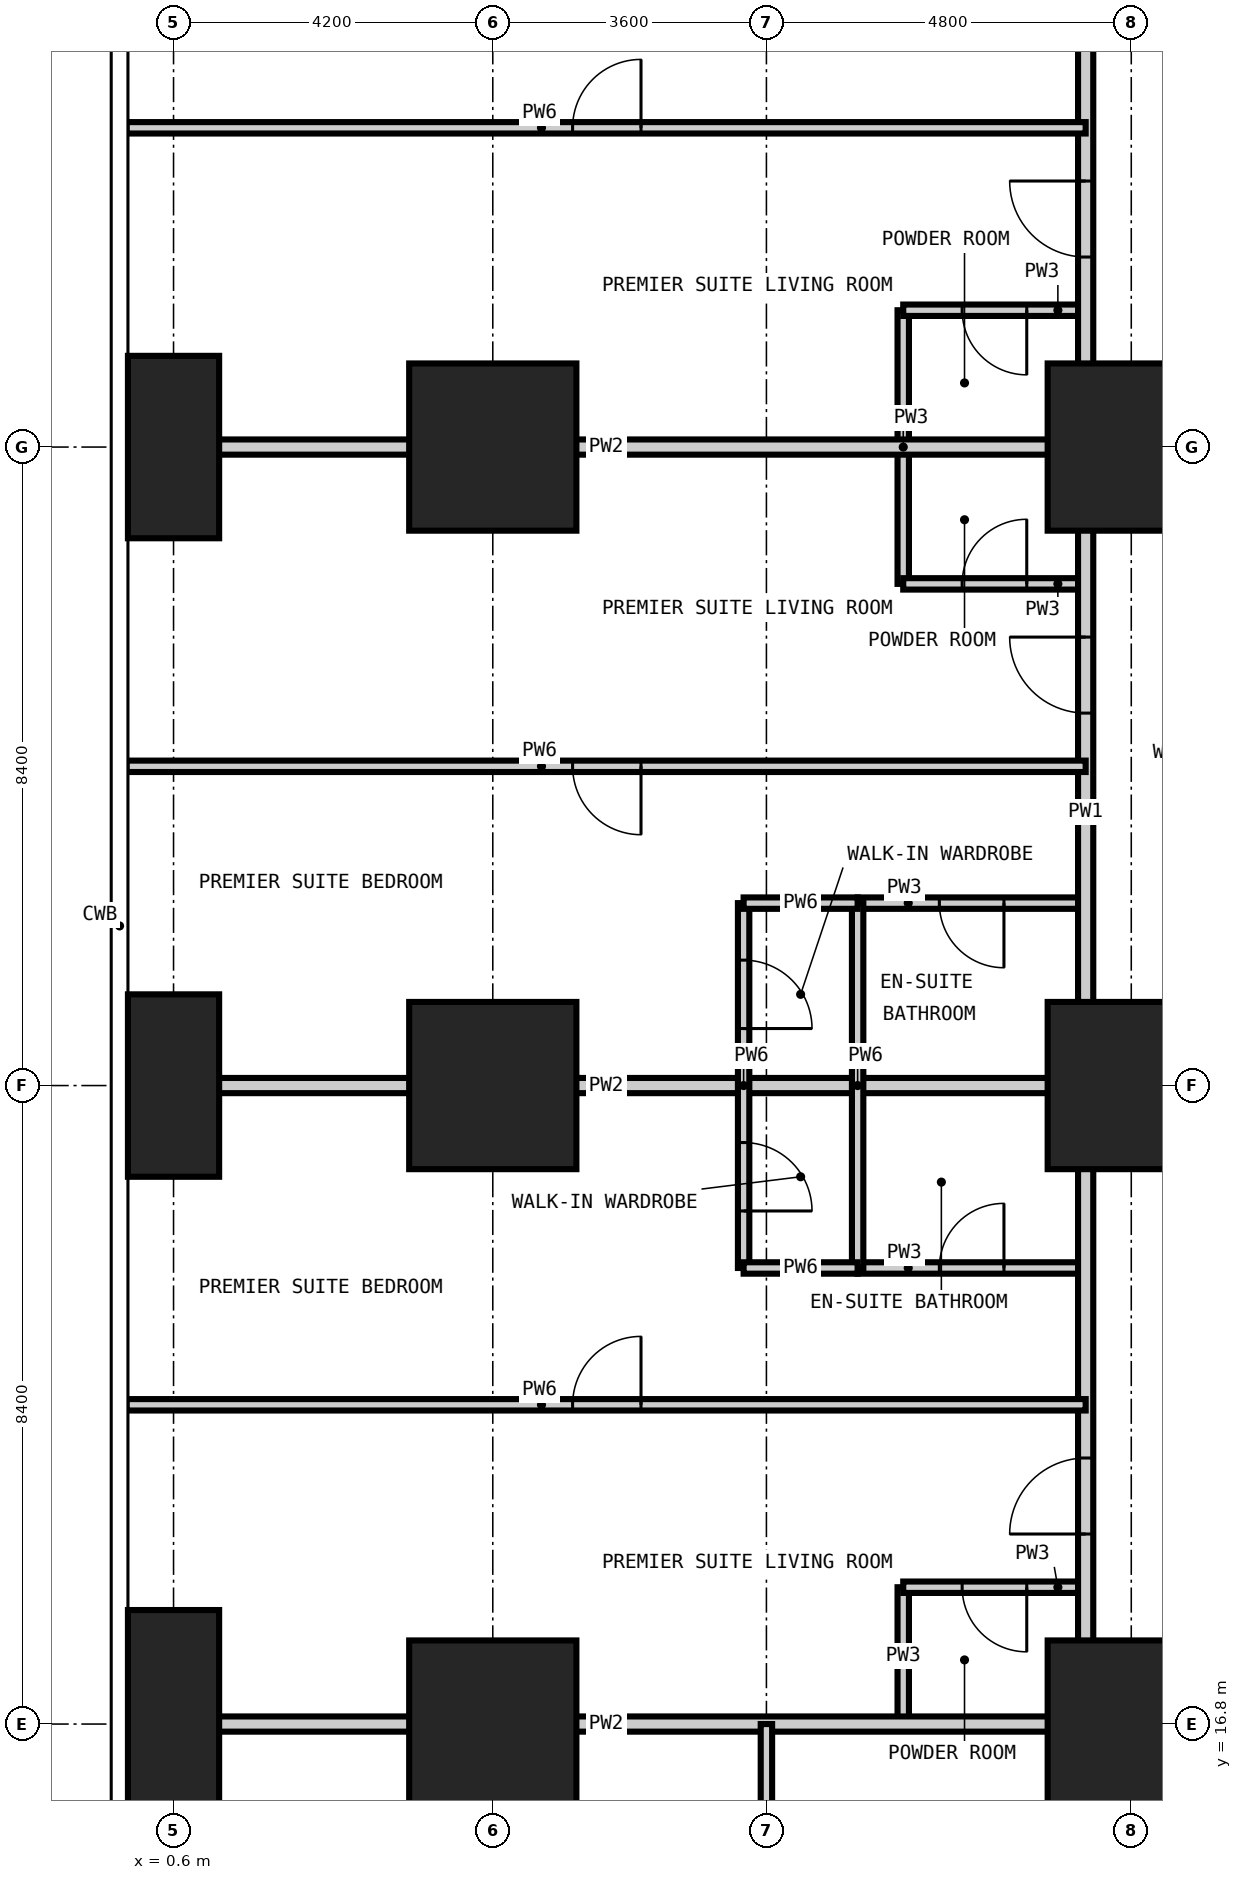
"""IFC4 building model, lengths in metres.
Left out: names, types, materials, properties, quantities, classifications, styles, units other than length and angle.
Written with IfcOpenShell. Run it as: python <this file> out.ifc"""

import sys

from ifc_helpers import new_model, si_unit, direction, frame, frame_2d, origin, origin_2d, place, context, subcontext, project, spatial, rectangle, extrude, element, fill, save


model = new_model("IFC4")
c1 = context("Model", 3, precision=1e-05, world=origin(), true_north=direction((0.0, 1.0)))
c2 = subcontext(c1, "Body", "Model", "MODEL_VIEW")
j1 = project(units=[si_unit("LENGTHUNIT", "METRE"), si_unit("PLANEANGLEUNIT", "RADIAN")], contexts=[c1])
p1 = place(None, origin())
s1 = spatial("IfcSite", under=j1, at=p1, CompositionType="ELEMENT")
p2 = place(p1, origin())
s2 = spatial("IfcBuilding", under=s1, at=p2, CompositionType="ELEMENT")
p3 = place(p2, frame((0.0, 0.0, 93.6)))
s3 = spatial("IfcBuildingStorey", under=s2, at=p3, CompositionType="ELEMENT", Elevation=93.6)
p4 = place(p3, frame((0.6, 16.8, -0.35), z_axis=(0.0, 0.0, 1.0), x_axis=(1.0, 0.0, 0.0)))
e1 = element("IfcColumn", 1, at=p4, inside=s3, PredefinedType="COLUMN", context=c2, shape_type="SweptSolid", body=[
    extrude(rectangle(XDim=1.2, YDim=3.0, at=origin_2d()), origin(), (0.0, 0.0, 1.0), 3.6),
])
for number, where, z_axis, x_axis in (
    (2, (0.6, 25.2, -0.35), (0.0, 0.0, 1.0), (1.0, 0.0, 0.0)),
    (3, (0.6, 33.6, -0.35), (0.0, 0.0, 1.0), (1.0, 0.0, 0.0)),
):
    element("IfcColumn", number, at=place(p3, frame(where, z_axis=z_axis, x_axis=x_axis)), inside=s3, PredefinedType="COLUMN", context=c2, shape_type="SweptSolid", body=[
        extrude(rectangle(XDim=1.2, YDim=2.4, at=origin_2d()), origin(), (0.0, 0.0, 1.0), 3.6),
    ])
for number, where, z_axis, x_axis in (
    (4, (4.8, 16.8, -0.35), (0.0, 0.0, 1.0), (1.0, 0.0, 0.0)),
    (5, (4.8, 25.2, -0.35), (0.0, 0.0, 1.0), (1.0, 0.0, 0.0)),
    (6, (4.8, 33.6, -0.35), (0.0, 0.0, 1.0), (1.0, 0.0, 0.0)),
    (7, (13.2, 16.8, -0.35), (0.0, 0.0, 1.0), (1.0, 0.0, 0.0)),
    (8, (13.2, 25.2, -0.35), (0.0, 0.0, 1.0), (1.0, 0.0, 0.0)),
    (9, (13.2, 33.6, -0.35), (0.0, 0.0, 1.0), (1.0, 0.0, 0.0)),
):
    element("IfcColumn", number, at=place(p3, frame(where, z_axis=z_axis, x_axis=x_axis)), inside=s3, PredefinedType="COLUMN", context=c2, shape_type="SweptSolid", body=[
        extrude(rectangle(XDim=2.2, YDim=2.2, at=origin_2d()), origin(), (0.0, 0.0, 1.0), 3.6),
    ])
p5 = place(p3, frame((10.2, 16.8, 0.0), z_axis=(0.0, 0.0, 1.0), x_axis=(0.0, 1.0, 0.0)))
e10 = element("IfcWall", 10, at=p5, inside=s3, PredefinedType="PARTITIONING", context=c2, shape_type="SweptSolid", body=[
    extrude(rectangle(XDim=1.8, YDim=0.15, at=frame_2d((0.9, 0.0))), origin(), (0.0, 0.0, 1.0), 3.25),
])
p6 = place(p3, frame((10.2, 31.8, 0.0), z_axis=(0.0, 0.0, 1.0), x_axis=(0.0, 1.0, 0.0)))
e11 = element("IfcWall", 11, at=p6, inside=s3, PredefinedType="PARTITIONING", context=c2, shape_type="SweptSolid", body=[
    extrude(rectangle(XDim=3.6, YDim=0.15, at=frame_2d((1.8, 0.0))), origin(), (0.0, 0.0, 1.0), 3.25),
])
p7 = place(p3, frame((10.2, 18.6, 0.0), z_axis=(0.0, 0.0, 1.0), x_axis=(1.0, 0.0, 0.0)))
e12 = element("IfcWall", 12, at=p7, inside=s3, PredefinedType="PARTITIONING", context=c2, shape_type="SweptSolid", body=[
    extrude(rectangle(XDim=2.4, YDim=0.15, at=frame_2d((1.2, 0.0))), origin(), (0.0, 0.0, 1.0), 3.25),
])
p8 = place(p7, frame((0.775, 0.0, 0.0)))
e13 = element("IfcOpeningElement", 13, at=p8, cuts=e12, PredefinedType="OPENING", context=c2, shape_type="SweptSolid", body=[
    extrude(rectangle(XDim=0.85, YDim=2.1, at=frame_2d((0.425, 1.05))), frame((0.0, 0.085, 0.0), z_axis=(0.0, -1.0, 0.0), x_axis=(1.0, 0.0, 0.0)), (0.0, 0.0, 1.0), 0.17),
])
p9 = place(p3, frame((9.6, 22.8, 0.0), z_axis=(0.0, 0.0, 1.0), x_axis=(1.0, 0.0, 0.0)))
e14 = element("IfcWall", 14, at=p9, inside=s3, PredefinedType="PARTITIONING", context=c2, shape_type="SweptSolid", body=[
    extrude(rectangle(XDim=3.0, YDim=0.15, at=frame_2d((1.5, 0.0))), origin(), (0.0, 0.0, 1.0), 3.25),
])
p10 = place(p9, frame((1.075, 0.0, 0.0)))
e15 = element("IfcOpeningElement", 15, at=p10, cuts=e14, PredefinedType="OPENING", context=c2, shape_type="SweptSolid", body=[
    extrude(rectangle(XDim=0.85, YDim=2.1, at=frame_2d((0.425, 1.05))), frame((0.0, 0.085, 0.0), z_axis=(0.0, -1.0, 0.0), x_axis=(1.0, 0.0, 0.0)), (0.0, 0.0, 1.0), 0.17),
])
p11 = place(p3, frame((9.6, 27.6, 0.0), z_axis=(0.0, 0.0, 1.0), x_axis=(1.0, 0.0, 0.0)))
e16 = element("IfcWall", 16, at=p11, inside=s3, PredefinedType="PARTITIONING", context=c2, shape_type="SweptSolid", body=[
    extrude(rectangle(XDim=3.0, YDim=0.15, at=frame_2d((1.5, 0.0))), origin(), (0.0, 0.0, 1.0), 3.25),
])
p12 = place(p11, frame((1.075, 0.0, 0.0)))
e17 = element("IfcOpeningElement", 17, at=p12, cuts=e16, PredefinedType="OPENING", context=c2, shape_type="SweptSolid", body=[
    extrude(rectangle(XDim=0.85, YDim=2.1, at=frame_2d((0.425, 1.05))), frame((0.0, 0.085, 0.0), z_axis=(0.0, -1.0, 0.0), x_axis=(1.0, 0.0, 0.0)), (0.0, 0.0, 1.0), 0.17),
])
p13 = place(p3, frame((10.2, 31.8, 0.0), z_axis=(0.0, 0.0, 1.0), x_axis=(1.0, 0.0, 0.0)))
e18 = element("IfcWall", 18, at=p13, inside=s3, PredefinedType="PARTITIONING", context=c2, shape_type="SweptSolid", body=[
    extrude(rectangle(XDim=2.4, YDim=0.15, at=frame_2d((1.2, 0.0))), origin(), (0.0, 0.0, 1.0), 3.25),
])
p14 = place(p13, frame((0.775, 0.0, 0.0)))
e19 = element("IfcOpeningElement", 19, at=p14, cuts=e18, PredefinedType="OPENING", context=c2, shape_type="SweptSolid", body=[
    extrude(rectangle(XDim=0.85, YDim=2.1, at=frame_2d((0.425, 1.05))), frame((0.0, 0.085, 0.0), z_axis=(0.0, -1.0, 0.0), x_axis=(1.0, 0.0, 0.0)), (0.0, 0.0, 1.0), 0.17),
])
p15 = place(p3, frame((10.2, 35.4, 0.0), z_axis=(0.0, 0.0, 1.0), x_axis=(1.0, 0.0, 0.0)))
e20 = element("IfcWall", 20, at=p15, inside=s3, PredefinedType="PARTITIONING", context=c2, shape_type="SweptSolid", body=[
    extrude(rectangle(XDim=2.4, YDim=0.15, at=frame_2d((1.2, 0.0))), origin(), (0.0, 0.0, 1.0), 3.25),
])
p16 = place(p15, frame((0.775, 0.0, 0.0)))
e21 = element("IfcOpeningElement", 21, at=p16, cuts=e20, PredefinedType="OPENING", context=c2, shape_type="SweptSolid", body=[
    extrude(rectangle(XDim=0.85, YDim=2.1, at=frame_2d((0.425, 1.05))), frame((0.0, 0.085, 0.0), z_axis=(0.0, -1.0, 0.0), x_axis=(1.0, 0.0, 0.0)), (0.0, 0.0, 1.0), 0.17),
])
p17 = place(p3, frame((12.6, 13.1, 0.0), z_axis=(0.0, 0.0, 1.0), x_axis=(0.0, 1.0, 0.0)))
e22 = element("IfcWall", 22, at=p17, inside=s3, PredefinedType="PARTITIONING", context=c2, shape_type="SweptSolid", body=[
    extrude(rectangle(XDim=31.4, YDim=0.2, at=frame_2d((15.7, 0.0))), origin(), (0.0, 0.0, 1.0), 3.25),
])
p18 = place(p17, frame((6.2, 0.0, 0.0)))
e23 = element("IfcOpeningElement", 23, at=p18, cuts=e22, PredefinedType="OPENING", context=c2, shape_type="SweptSolid", body=[
    extrude(rectangle(XDim=1.0, YDim=2.2, at=frame_2d((0.5, 1.1))), frame((0.0, 0.11, 0.0), z_axis=(0.0, -1.0, 0.0), x_axis=(1.0, 0.0, 0.0)), (0.0, 0.0, 1.0), 0.22),
])
p19 = place(p17, frame((17.0, 0.0, 0.0)))
e24 = element("IfcOpeningElement", 24, at=p19, cuts=e22, PredefinedType="OPENING", context=c2, shape_type="SweptSolid", body=[
    extrude(rectangle(XDim=1.0, YDim=2.2, at=frame_2d((0.5, 1.1))), frame((0.0, 0.11, 0.0), z_axis=(0.0, -1.0, 0.0), x_axis=(1.0, 0.0, 0.0)), (0.0, 0.0, 1.0), 0.22),
])
p20 = place(p17, frame((23.0, 0.0, 0.0)))
e25 = element("IfcOpeningElement", 25, at=p20, cuts=e22, PredefinedType="OPENING", context=c2, shape_type="SweptSolid", body=[
    extrude(rectangle(XDim=1.0, YDim=2.2, at=frame_2d((0.5, 1.1))), frame((0.0, 0.11, 0.0), z_axis=(0.0, -1.0, 0.0), x_axis=(1.0, 0.0, 0.0)), (0.0, 0.0, 1.0), 0.22),
])
p21 = place(p17, frame((1.35, 0.0, 0.0)))
e26 = element("IfcOpeningElement", 26, at=p21, cuts=e22, PredefinedType="OPENING", context=c2, shape_type="SweptSolid", body=[
    extrude(rectangle(XDim=1.0, YDim=2.2, at=frame_2d((0.5, 1.1))), frame((0.0, 0.11, 0.0), z_axis=(0.0, -1.0, 0.0), x_axis=(1.0, 0.0, 0.0)), (0.0, 0.0, 1.0), 0.22),
])
p22 = place(p17, frame((30.05, 0.0, 0.0)))
e27 = element("IfcOpeningElement", 27, at=p22, cuts=e22, PredefinedType="OPENING", context=c2, shape_type="SweptSolid", body=[
    extrude(rectangle(XDim=1.0, YDim=2.2, at=frame_2d((0.5, 1.1))), frame((0.0, 0.11, 0.0), z_axis=(0.0, -1.0, 0.0), x_axis=(1.0, 0.0, 0.0)), (0.0, 0.0, 1.0), 0.22),
])
for number, where, z_axis, x_axis in (
    (28, (-0.018, 16.8, 0.0), (0.0, 0.0, 1.0), (1.0, 0.0, 0.0)),
    (29, (-0.018, 25.2, 0.0), (0.0, 0.0, 1.0), (1.0, 0.0, 0.0)),
    (30, (-0.018, 33.6, 0.0), (0.0, 0.0, 1.0), (1.0, 0.0, 0.0)),
):
    element("IfcWall", number, at=place(p3, frame(where, z_axis=z_axis, x_axis=x_axis)), inside=s3, PredefinedType="PARTITIONING", context=c2, shape_type="SweptSolid", body=[
        extrude(rectangle(XDim=12.618, YDim=0.2, at=frame_2d((6.309, 0.0))), origin(), (0.0, 0.0, 1.0), 3.25),
    ])
p23 = place(p3, frame((8.1, 22.8, 0.0), z_axis=(0.0, 0.0, 1.0), x_axis=(0.0, 1.0, 0.0)))
e31 = element("IfcWall", 31, at=p23, inside=s3, PredefinedType="PARTITIONING", context=c2, shape_type="SweptSolid", body=[
    extrude(rectangle(XDim=4.8, YDim=0.15, at=frame_2d((2.4, 0.0))), origin(), (0.0, 0.0, 1.0), 3.25),
])
p24 = place(p23, frame((0.75, 0.0, 0.0)))
e32 = element("IfcOpeningElement", 32, at=p24, cuts=e31, PredefinedType="OPENING", context=c2, shape_type="SweptSolid", body=[
    extrude(rectangle(XDim=0.9, YDim=2.1, at=frame_2d((0.45, 1.05))), frame((0.0, 0.085, 0.0), z_axis=(0.0, -1.0, 0.0), x_axis=(1.0, 0.0, 0.0)), (0.0, 0.0, 1.0), 0.17),
])
p25 = place(p23, frame((3.15, 0.0, 0.0)))
e33 = element("IfcOpeningElement", 33, at=p25, cuts=e31, PredefinedType="OPENING", context=c2, shape_type="SweptSolid", body=[
    extrude(rectangle(XDim=0.9, YDim=2.1, at=frame_2d((0.45, 1.05))), frame((0.0, 0.085, 0.0), z_axis=(0.0, -1.0, 0.0), x_axis=(1.0, 0.0, 0.0)), (0.0, 0.0, 1.0), 0.17),
])
p26 = place(p3, frame((8.4, -0.018, 0.0), z_axis=(0.0, 0.0, 1.0), x_axis=(0.0, 1.0, 0.0)))
e34 = element("IfcWall", 34, at=p26, inside=s3, PredefinedType="PARTITIONING", context=c2, shape_type="SweptSolid", body=[
    extrude(rectangle(XDim=16.818, YDim=0.15, at=frame_2d((8.409, 0.0))), origin(), (0.0, 0.0, 1.0), 3.25),
])
p27 = place(p26, frame((1.968, 0.0, 0.0)))
e35 = element("IfcOpeningElement", 35, at=p27, cuts=e34, PredefinedType="OPENING", context=c2, shape_type="SweptSolid", body=[
    extrude(rectangle(XDim=0.9, YDim=2.1, at=frame_2d((0.45, 1.05))), frame((0.0, 0.085, 0.0), z_axis=(0.0, -1.0, 0.0), x_axis=(1.0, 0.0, 0.0)), (0.0, 0.0, 1.0), 0.17),
])
p28 = place(p26, frame((12.168, 0.0, 0.0)))
e36 = element("IfcOpeningElement", 36, at=p28, cuts=e34, PredefinedType="OPENING", context=c2, shape_type="SweptSolid", body=[
    extrude(rectangle(XDim=0.9, YDim=2.1, at=frame_2d((0.45, 1.05))), frame((0.0, 0.085, 0.0), z_axis=(0.0, -1.0, 0.0), x_axis=(1.0, 0.0, 0.0)), (0.0, 0.0, 1.0), 0.17),
])
p29 = place(p3, frame((9.6, 22.8, 0.0), z_axis=(0.0, 0.0, 1.0), x_axis=(0.0, 1.0, 0.0)))
e37 = element("IfcWall", 37, at=p29, inside=s3, PredefinedType="PARTITIONING", context=c2, shape_type="SweptSolid", body=[
    extrude(rectangle(XDim=4.8, YDim=0.15, at=frame_2d((2.4, 0.0))), origin(), (0.0, 0.0, 1.0), 3.25),
])
p30 = place(p3, frame((-0.018, 21.0, 0.0), z_axis=(0.0, 0.0, 1.0), x_axis=(1.0, 0.0, 0.0)))
e38 = element("IfcWall", 38, at=p30, inside=s3, PredefinedType="PARTITIONING", context=c2, shape_type="SweptSolid", body=[
    extrude(rectangle(XDim=12.618, YDim=0.15, at=frame_2d((6.309, 0.0))), origin(), (0.0, 0.0, 1.0), 3.25),
])
p31 = place(p30, frame((5.868, 0.0, 0.0)))
e39 = element("IfcOpeningElement", 39, at=p31, cuts=e38, PredefinedType="OPENING", context=c2, shape_type="SweptSolid", body=[
    extrude(rectangle(XDim=0.9, YDim=2.1, at=frame_2d((0.45, 1.05))), frame((0.0, 0.085, 0.0), z_axis=(0.0, -1.0, 0.0), x_axis=(1.0, 0.0, 0.0)), (0.0, 0.0, 1.0), 0.17),
])
for number, where, z_axis, x_axis in (
    (40, (8.1, 22.8, 0.0), (0.0, 0.0, 1.0), (1.0, 0.0, 0.0)),
    (41, (8.1, 27.6, 0.0), (0.0, 0.0, 1.0), (1.0, 0.0, 0.0)),
):
    element("IfcWall", number, at=place(p3, frame(where, z_axis=z_axis, x_axis=x_axis)), inside=s3, PredefinedType="PARTITIONING", context=c2, shape_type="SweptSolid", body=[
        extrude(rectangle(XDim=1.5, YDim=0.15, at=frame_2d((0.75, 0.0))), origin(), (0.0, 0.0, 1.0), 3.25),
    ])
p32 = place(p3, frame((-0.018, 29.4, 0.0), z_axis=(0.0, 0.0, 1.0), x_axis=(1.0, 0.0, 0.0)))
e42 = element("IfcWall", 42, at=p32, inside=s3, PredefinedType="PARTITIONING", context=c2, shape_type="SweptSolid", body=[
    extrude(rectangle(XDim=12.618, YDim=0.15, at=frame_2d((6.309, 0.0))), origin(), (0.0, 0.0, 1.0), 3.25),
])
p33 = place(p32, frame((5.868, 0.0, 0.0)))
e43 = element("IfcOpeningElement", 43, at=p33, cuts=e42, PredefinedType="OPENING", context=c2, shape_type="SweptSolid", body=[
    extrude(rectangle(XDim=0.9, YDim=2.1, at=frame_2d((0.45, 1.05))), frame((0.0, 0.085, 0.0), z_axis=(0.0, -1.0, 0.0), x_axis=(1.0, 0.0, 0.0)), (0.0, 0.0, 1.0), 0.17),
])
p34 = place(p3, frame((-0.018, 37.8, 0.0), z_axis=(0.0, 0.0, 1.0), x_axis=(1.0, 0.0, 0.0)))
e44 = element("IfcWall", 44, at=p34, inside=s3, PredefinedType="PARTITIONING", context=c2, shape_type="SweptSolid", body=[
    extrude(rectangle(XDim=12.618, YDim=0.15, at=frame_2d((6.309, 0.0))), origin(), (0.0, 0.0, 1.0), 3.25),
])
p35 = place(p34, frame((5.868, 0.0, 0.0)))
e45 = element("IfcOpeningElement", 45, at=p35, cuts=e44, PredefinedType="OPENING", context=c2, shape_type="SweptSolid", body=[
    extrude(rectangle(XDim=0.9, YDim=2.1, at=frame_2d((0.45, 1.05))), frame((0.0, 0.085, 0.0), z_axis=(0.0, -1.0, 0.0), x_axis=(1.0, 0.0, 0.0)), (0.0, 0.0, 1.0), 0.17),
])
p36 = place(p18, origin())
e46 = element("IfcDoor", 46, at=p36, inside=s3, OperationType="SINGLE_SWING_LEFT", PredefinedType="DOOR", context=c2, shape_type="SweptSolid", body=[
    extrude(rectangle(XDim=1.0, YDim=2.2, at=frame_2d((0.5, 1.1))), frame((0.0, 0.025, 0.0), z_axis=(0.0, -1.0, 0.0), x_axis=(1.0, 0.0, 0.0)), (0.0, 0.0, 1.0), 0.05),
])
fill(e23, e46)
p37 = place(p8, frame((0.85, 0.0, 0.0), z_axis=(0.0, 0.0, 1.0), x_axis=(-1.0, 0.0, 0.0)))
e47 = element("IfcDoor", 47, at=p37, inside=s3, OperationType="SINGLE_SWING_LEFT", PredefinedType="DOOR", context=c2, shape_type="SweptSolid", body=[
    extrude(rectangle(XDim=0.85, YDim=2.1, at=frame_2d((0.425, 1.05))), frame((0.0, 0.025, 0.0), z_axis=(0.0, -1.0, 0.0), x_axis=(1.0, 0.0, 0.0)), (0.0, 0.0, 1.0), 0.05),
])
fill(e13, e47)
p38 = place(p31, origin())
e48 = element("IfcDoor", 48, at=p38, inside=s3, OperationType="SINGLE_SWING_RIGHT", PredefinedType="DOOR", context=c2, shape_type="SweptSolid", body=[
    extrude(rectangle(XDim=0.9, YDim=2.1, at=frame_2d((0.45, 1.05))), frame((0.0, 0.025, 0.0), z_axis=(0.0, -1.0, 0.0), x_axis=(1.0, 0.0, 0.0)), (0.0, 0.0, 1.0), 0.05),
])
fill(e39, e48)
p39 = place(p10, origin())
e49 = element("IfcDoor", 49, at=p39, inside=s3, OperationType="SINGLE_SWING_RIGHT", PredefinedType="DOOR", context=c2, shape_type="SweptSolid", body=[
    extrude(rectangle(XDim=0.85, YDim=2.1, at=frame_2d((0.425, 1.05))), frame((0.0, 0.025, 0.0), z_axis=(0.0, -1.0, 0.0), x_axis=(1.0, 0.0, 0.0)), (0.0, 0.0, 1.0), 0.05),
])
fill(e15, e49)
p40 = place(p24, frame((0.9, 0.0, 0.0), z_axis=(0.0, 0.0, 1.0), x_axis=(-1.0, 0.0, 0.0)))
e50 = element("IfcDoor", 50, at=p40, inside=s3, OperationType="SINGLE_SWING_RIGHT", PredefinedType="DOOR", context=c2, shape_type="SweptSolid", body=[
    extrude(rectangle(XDim=0.9, YDim=2.1, at=frame_2d((0.45, 1.05))), frame((0.0, 0.025, 0.0), z_axis=(0.0, -1.0, 0.0), x_axis=(1.0, 0.0, 0.0)), (0.0, 0.0, 1.0), 0.05),
])
fill(e32, e50)
p41 = place(p19, origin())
e51 = element("IfcDoor", 51, at=p41, inside=s3, OperationType="SINGLE_SWING_RIGHT", PredefinedType="DOOR", context=c2, shape_type="SweptSolid", body=[
    extrude(rectangle(XDim=1.0, YDim=2.2, at=frame_2d((0.5, 1.1))), frame((0.0, 0.025, 0.0), z_axis=(0.0, -1.0, 0.0), x_axis=(1.0, 0.0, 0.0)), (0.0, 0.0, 1.0), 0.05),
])
fill(e24, e51)
p42 = place(p14, origin())
e52 = element("IfcDoor", 52, at=p42, inside=s3, OperationType="SINGLE_SWING_RIGHT", PredefinedType="DOOR", context=c2, shape_type="SweptSolid", body=[
    extrude(rectangle(XDim=0.85, YDim=2.1, at=frame_2d((0.425, 1.05))), frame((0.0, 0.025, 0.0), z_axis=(0.0, -1.0, 0.0), x_axis=(1.0, 0.0, 0.0)), (0.0, 0.0, 1.0), 0.05),
])
fill(e19, e52)
p43 = place(p33, frame((0.9, 0.0, 0.0), z_axis=(0.0, 0.0, 1.0), x_axis=(-1.0, 0.0, 0.0)))
e53 = element("IfcDoor", 53, at=p43, inside=s3, OperationType="SINGLE_SWING_LEFT", PredefinedType="DOOR", context=c2, shape_type="SweptSolid", body=[
    extrude(rectangle(XDim=0.9, YDim=2.1, at=frame_2d((0.45, 1.05))), frame((0.0, 0.025, 0.0), z_axis=(0.0, -1.0, 0.0), x_axis=(1.0, 0.0, 0.0)), (0.0, 0.0, 1.0), 0.05),
])
fill(e43, e53)
p44 = place(p12, frame((0.85, 0.0, 0.0), z_axis=(0.0, 0.0, 1.0), x_axis=(-1.0, 0.0, 0.0)))
e54 = element("IfcDoor", 54, at=p44, inside=s3, OperationType="SINGLE_SWING_LEFT", PredefinedType="DOOR", context=c2, shape_type="SweptSolid", body=[
    extrude(rectangle(XDim=0.85, YDim=2.1, at=frame_2d((0.425, 1.05))), frame((0.0, 0.025, 0.0), z_axis=(0.0, -1.0, 0.0), x_axis=(1.0, 0.0, 0.0)), (0.0, 0.0, 1.0), 0.05),
])
fill(e17, e54)
p45 = place(p25, frame((0.9, 0.0, 0.0), z_axis=(0.0, 0.0, 1.0), x_axis=(-1.0, 0.0, 0.0)))
e55 = element("IfcDoor", 55, at=p45, inside=s3, OperationType="SINGLE_SWING_RIGHT", PredefinedType="DOOR", context=c2, shape_type="SweptSolid", body=[
    extrude(rectangle(XDim=0.9, YDim=2.1, at=frame_2d((0.45, 1.05))), frame((0.0, 0.025, 0.0), z_axis=(0.0, -1.0, 0.0), x_axis=(1.0, 0.0, 0.0)), (0.0, 0.0, 1.0), 0.05),
])
fill(e33, e55)
p46 = place(p20, origin())
e56 = element("IfcDoor", 56, at=p46, inside=s3, OperationType="SINGLE_SWING_RIGHT", PredefinedType="DOOR", context=c2, shape_type="SweptSolid", body=[
    extrude(rectangle(XDim=1.0, YDim=2.2, at=frame_2d((0.5, 1.1))), frame((0.0, 0.025, 0.0), z_axis=(0.0, -1.0, 0.0), x_axis=(1.0, 0.0, 0.0)), (0.0, 0.0, 1.0), 0.05),
])
fill(e25, e56)
p47 = place(p16, frame((0.85, 0.0, 0.0), z_axis=(0.0, 0.0, 1.0), x_axis=(-1.0, 0.0, 0.0)))
e57 = element("IfcDoor", 57, at=p47, inside=s3, OperationType="SINGLE_SWING_LEFT", PredefinedType="DOOR", context=c2, shape_type="SweptSolid", body=[
    extrude(rectangle(XDim=0.85, YDim=2.1, at=frame_2d((0.425, 1.05))), frame((0.0, 0.025, 0.0), z_axis=(0.0, -1.0, 0.0), x_axis=(1.0, 0.0, 0.0)), (0.0, 0.0, 1.0), 0.05),
])
fill(e21, e57)
p48 = place(p35, origin())
e58 = element("IfcDoor", 58, at=p48, inside=s3, OperationType="SINGLE_SWING_RIGHT", PredefinedType="DOOR", context=c2, shape_type="SweptSolid", body=[
    extrude(rectangle(XDim=0.9, YDim=2.1, at=frame_2d((0.45, 1.05))), frame((0.0, 0.025, 0.0), z_axis=(0.0, -1.0, 0.0), x_axis=(1.0, 0.0, 0.0)), (0.0, 0.0, 1.0), 0.05),
])
fill(e45, e58)
save(model, sys.argv[1])
